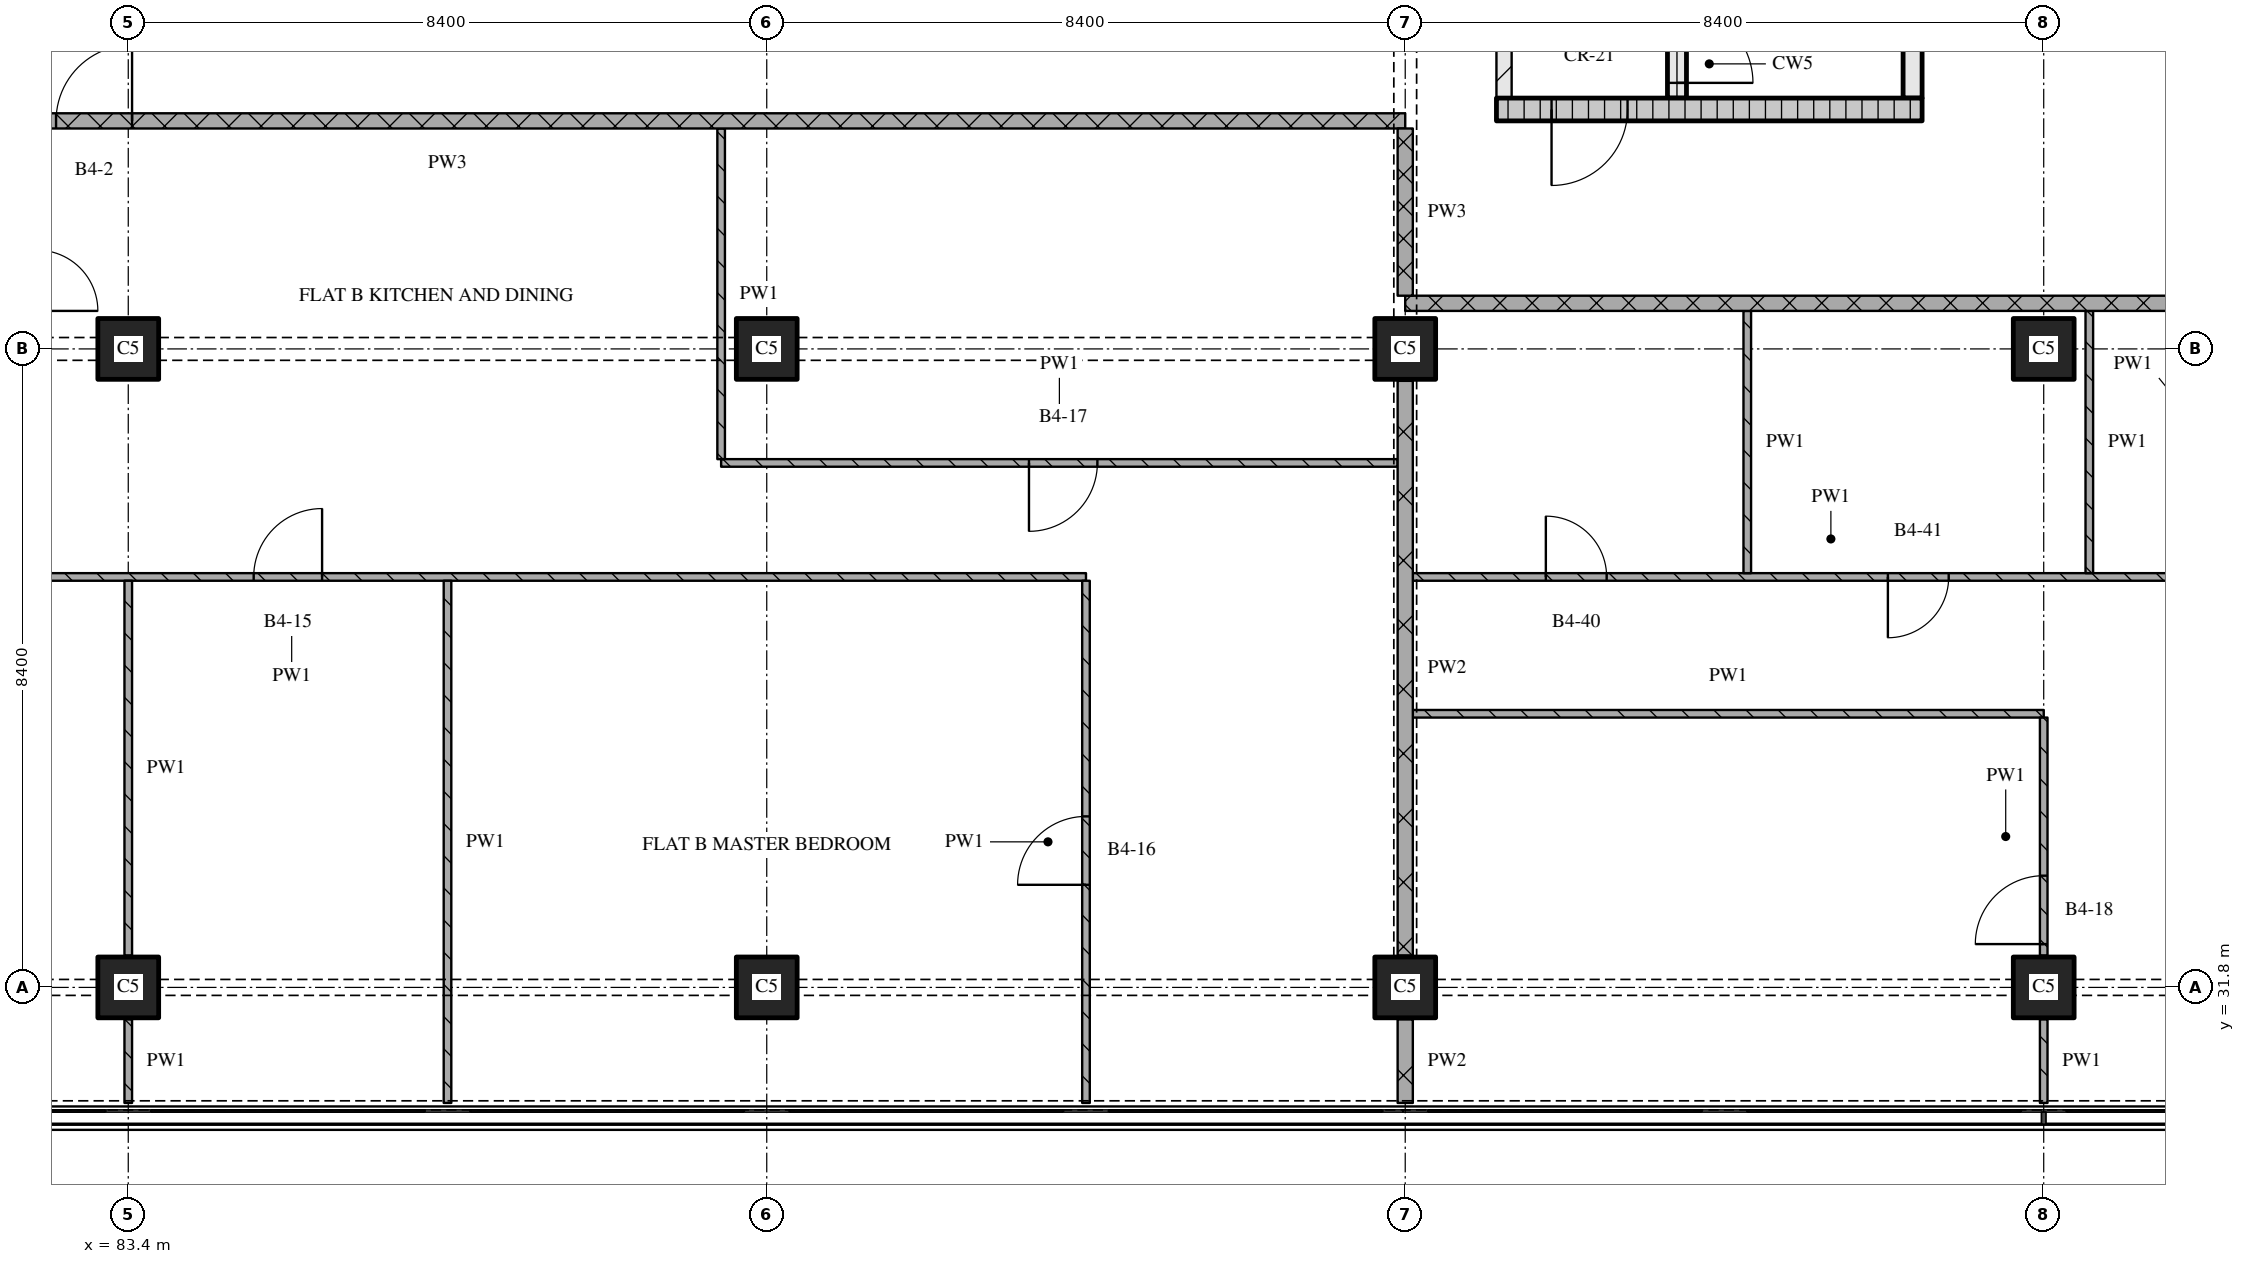
"""IFC4 building model, lengths in metres.
Left out: names, types, materials, properties, quantities, classifications, styles, units other than length and angle.
Written with IfcOpenShell. Run it as: python <this file> out.ifc"""

import sys

from ifc_helpers import new_model, si_unit, direction, frame, frame_2d, origin, origin_2d, place, context, subcontext, project, spatial, rectangle, extrude, element, fill, save


model = new_model("IFC4")
c1 = context("Model", 3, precision=1e-05, world=origin(), true_north=direction((0.0, 1.0)))
c2 = subcontext(c1, "Body", "Model", "MODEL_VIEW")
j1 = project(units=[si_unit("LENGTHUNIT", "METRE"), si_unit("PLANEANGLEUNIT", "RADIAN")], contexts=[c1])
p1 = place(None, origin())
s1 = spatial("IfcSite", under=j1, at=p1, CompositionType="ELEMENT")
p2 = place(p1, origin())
s2 = spatial("IfcBuilding", under=s1, at=p2, CompositionType="ELEMENT")
p3 = place(p2, frame((0.0, 0.0, 127.65)))
s3 = spatial("IfcBuildingStorey", under=s2, at=p3, CompositionType="ELEMENT", Elevation=127.65)
for number, where, z_axis, x_axis in (
    (1, (83.4, 31.8, 0.0), (0.0, 0.0, 1.0), (1.0, 0.0, 0.0)),
    (2, (83.4, 40.2, 0.0), (0.0, 0.0, 1.0), (1.0, 0.0, 0.0)),
    (3, (91.8, 31.8, 0.0), (0.0, 0.0, 1.0), (1.0, 0.0, 0.0)),
    (4, (91.8, 40.2, 0.0), (0.0, 0.0, 1.0), (1.0, 0.0, 0.0)),
    (5, (100.2, 31.8, 0.0), (0.0, 0.0, 1.0), (1.0, 0.0, 0.0)),
    (6, (100.2, 40.2, 0.0), (0.0, 0.0, 1.0), (1.0, 0.0, 0.0)),
    (7, (108.6, 31.8, 0.0), (0.0, 0.0, 1.0), (1.0, 0.0, 0.0)),
    (8, (108.6, 40.2, 0.0), (0.0, 0.0, 1.0), (1.0, 0.0, 0.0)),
):
    element("IfcColumn", number, at=place(p3, frame(where, z_axis=z_axis, x_axis=x_axis)), inside=s3, PredefinedType="COLUMN", context=c2, shape_type="SweptSolid", body=[
        extrude(rectangle(XDim=0.8, YDim=0.8, at=origin_2d()), origin(), (0.0, 0.0, 1.0), 3.6),
    ])
p4 = place(p3, frame((101.4, 43.35, 0.0), z_axis=(0.0, 0.0, 1.0), x_axis=(1.0, 0.0, 0.0)))
e9 = element("IfcWall", 9, at=p4, inside=s3, PredefinedType="SOLIDWALL", context=c2, shape_type="SweptSolid", body=[
    extrude(rectangle(XDim=5.6, YDim=0.3, at=frame_2d((2.8, 0.0))), origin(), (0.0, 0.0, 1.0), 3.32),
])
p5 = place(p4, frame((0.725, 0.0, 0.0)))
e10 = element("IfcOpeningElement", 10, at=p5, cuts=e9, PredefinedType="OPENING", context=c2, shape_type="SweptSolid", body=[
    extrude(rectangle(XDim=1.0, YDim=2.1, at=frame_2d((0.5, 1.05))), frame((0.0, 0.16, 0.0), z_axis=(0.0, -1.0, 0.0), x_axis=(1.0, 0.0, 0.0)), (0.0, 0.0, 1.0), 0.32),
])
p6 = place(p3, frame((101.5, 43.5, 0.0), z_axis=(0.0, 0.0, 1.0), x_axis=(0.0, 1.0, 0.0)))
e11 = element("IfcWall", 11, at=p6, inside=s3, PredefinedType="PARTITIONING", context=c2, shape_type="SweptSolid", body=[
    extrude(rectangle(XDim=6.9, YDim=0.2, at=frame_2d((3.45, 0.0))), origin(), (0.0, 0.0, 1.0), 3.32),
])
p7 = place(p6, frame((1.0, 0.0, 0.0)))
e12 = element("IfcOpeningElement", 12, at=p7, cuts=e11, PredefinedType="OPENING", context=c2, shape_type="SweptSolid", body=[
    extrude(rectangle(XDim=1.0, YDim=2.1, at=frame_2d((0.5, 1.05))), frame((0.0, 0.11, 0.0), z_axis=(0.0, -1.0, 0.0), x_axis=(1.0, 0.0, 0.0)), (0.0, 0.0, 1.0), 0.22),
])
p8 = place(p3, frame((103.775, 43.5, 0.0), z_axis=(0.0, 0.0, 1.0), x_axis=(0.0, 1.0, 0.0)))
e13 = element("IfcWall", 13, at=p8, inside=s3, PredefinedType="SOLIDWALL", context=c2, shape_type="SweptSolid", body=[
    extrude(rectangle(XDim=6.9, YDim=0.25, at=frame_2d((3.45, 0.0))), origin(), (0.0, 0.0, 1.0), 3.32),
])
p9 = place(p8, frame((0.2, 0.0, 0.0)))
e14 = element("IfcOpeningElement", 14, at=p9, cuts=e13, PredefinedType="OPENING", context=c2, shape_type="SweptSolid", body=[
    extrude(rectangle(XDim=1.0, YDim=2.1, at=frame_2d((0.5, 1.05))), frame((0.0, 0.135, 0.0), z_axis=(0.0, -1.0, 0.0), x_axis=(1.0, 0.0, 0.0)), (0.0, 0.0, 1.0), 0.27),
])
p10 = place(p3, frame((106.875, 43.5, 0.0), z_axis=(0.0, 0.0, 1.0), x_axis=(0.0, 1.0, 0.0)))
e15 = element("IfcWall", 15, at=p10, inside=s3, PredefinedType="SOLIDWALL", context=c2, shape_type="SweptSolid", body=[
    extrude(rectangle(XDim=6.9, YDim=0.25, at=frame_2d((3.45, 0.0))), origin(), (0.0, 0.0, 1.0), 3.32),
])
p11 = place(p3, frame((100.3, 35.4, 0.0), z_axis=(0.0, 0.0, 1.0), x_axis=(1.0, 0.0, 0.0)))
e16 = element("IfcWall", 16, at=p11, inside=s3, PredefinedType="PARTITIONING", context=c2, shape_type="SweptSolid", body=[
    extrude(rectangle(XDim=8.3, YDim=0.1, at=frame_2d((4.15, 0.0))), origin(), (0.0, 0.0, 1.0), 3.32),
])
p12 = place(p3, frame((96.0, 37.2, 0.0), z_axis=(0.0, 0.0, 1.0), x_axis=(-1.0, 0.0, 0.0)))
e17 = element("IfcWall", 17, at=p12, inside=s3, PredefinedType="PARTITIONING", context=c2, shape_type="SweptSolid", body=[
    extrude(rectangle(XDim=20.9, YDim=0.1, at=frame_2d((10.45, 0.0))), origin(), (0.0, 0.0, 1.0), 3.32),
])
p13 = place(p12, frame((10.05, 0.0, 0.0)))
e18 = element("IfcOpeningElement", 18, at=p13, cuts=e17, PredefinedType="OPENING", context=c2, shape_type="SweptSolid", body=[
    extrude(rectangle(XDim=0.9, YDim=2.1, at=frame_2d((0.45, 1.05))), frame((0.0, 0.06, 0.0), z_axis=(0.0, -1.0, 0.0), x_axis=(1.0, 0.0, 0.0)), (0.0, 0.0, 1.0), 0.12),
])
p14 = place(p12, frame((14.25, 0.0, 0.0)))
e19 = element("IfcOpeningElement", 19, at=p14, cuts=e17, PredefinedType="OPENING", context=c2, shape_type="SweptSolid", body=[
    extrude(rectangle(XDim=0.9, YDim=2.1, at=frame_2d((0.45, 1.05))), frame((0.0, 0.06, 0.0), z_axis=(0.0, -1.0, 0.0), x_axis=(1.0, 0.0, 0.0)), (0.0, 0.0, 1.0), 0.12),
])
p15 = place(p12, frame((18.45, 0.0, 0.0)))
e20 = element("IfcOpeningElement", 20, at=p15, cuts=e17, PredefinedType="OPENING", context=c2, shape_type="SweptSolid", body=[
    extrude(rectangle(XDim=0.9, YDim=2.1, at=frame_2d((0.45, 1.05))), frame((0.0, 0.06, 0.0), z_axis=(0.0, -1.0, 0.0), x_axis=(1.0, 0.0, 0.0)), (0.0, 0.0, 1.0), 0.12),
])
p16 = place(p3, frame((100.3, 37.2, 0.0), z_axis=(0.0, 0.0, 1.0), x_axis=(1.0, 0.0, 0.0)))
e21 = element("IfcWall", 21, at=p16, inside=s3, PredefinedType="PARTITIONING", context=c2, shape_type="SweptSolid", body=[
    extrude(rectangle(XDim=11.0, YDim=0.1, at=frame_2d((5.5, 0.0))), origin(), (0.0, 0.0, 1.0), 3.32),
])
p17 = place(p16, frame((1.75, 0.0, 0.0)))
e22 = element("IfcOpeningElement", 22, at=p17, cuts=e21, PredefinedType="OPENING", context=c2, shape_type="SweptSolid", body=[
    extrude(rectangle(XDim=0.8, YDim=2.1, at=frame_2d((0.4, 1.05))), frame((0.0, 0.06, 0.0), z_axis=(0.0, -1.0, 0.0), x_axis=(1.0, 0.0, 0.0)), (0.0, 0.0, 1.0), 0.12),
])
p18 = place(p16, frame((6.25, 0.0, 0.0)))
e23 = element("IfcOpeningElement", 23, at=p18, cuts=e21, PredefinedType="OPENING", context=c2, shape_type="SweptSolid", body=[
    extrude(rectangle(XDim=0.8, YDim=2.1, at=frame_2d((0.4, 1.05))), frame((0.0, 0.06, 0.0), z_axis=(0.0, -1.0, 0.0), x_axis=(1.0, 0.0, 0.0)), (0.0, 0.0, 1.0), 0.12),
])
p19 = place(p3, frame((91.2, 38.7, 0.0), z_axis=(0.0, 0.0, 1.0), x_axis=(1.0, 0.0, 0.0)))
e24 = element("IfcWall", 24, at=p19, inside=s3, PredefinedType="PARTITIONING", context=c2, shape_type="SweptSolid", body=[
    extrude(rectangle(XDim=8.9, YDim=0.1, at=frame_2d((4.45, 0.0))), origin(), (0.0, 0.0, 1.0), 3.32),
])
p20 = place(p19, frame((4.05, 0.0, 0.0)))
e25 = element("IfcOpeningElement", 25, at=p20, cuts=e24, PredefinedType="OPENING", context=c2, shape_type="SweptSolid", body=[
    extrude(rectangle(XDim=0.9, YDim=2.1, at=frame_2d((0.45, 1.05))), frame((0.0, 0.06, 0.0), z_axis=(0.0, -1.0, 0.0), x_axis=(1.0, 0.0, 0.0)), (0.0, 0.0, 1.0), 0.12),
])
p21 = place(p3, frame((124.38, 40.8, 0.0), z_axis=(0.0, 0.0, 1.0), x_axis=(-1.0, 0.0, 0.0)))
e26 = element("IfcWall", 26, at=p21, inside=s3, PredefinedType="PARTITIONING", context=c2, shape_type="SweptSolid", body=[
    extrude(rectangle(XDim=24.18, YDim=0.2, at=frame_2d((12.09, 0.0))), origin(), (0.0, 0.0, 1.0), 3.32),
])
p22 = place(p21, frame((11.83, 0.0, 0.0)))
e27 = element("IfcOpeningElement", 27, at=p22, cuts=e26, PredefinedType="OPENING", context=c2, shape_type="SweptSolid", body=[
    extrude(rectangle(XDim=1.0, YDim=2.1, at=frame_2d((0.5, 1.05))), frame((0.0, 0.11, 0.0), z_axis=(0.0, -1.0, 0.0), x_axis=(1.0, 0.0, 0.0)), (0.0, 0.0, 1.0), 0.22),
])
p23 = place(p3, frame((100.2, 43.2, 0.0), z_axis=(0.0, 0.0, 1.0), x_axis=(-1.0, 0.0, 0.0)))
e28 = element("IfcWall", 28, at=p23, inside=s3, PredefinedType="PARTITIONING", context=c2, shape_type="SweptSolid", body=[
    extrude(rectangle(XDim=25.2, YDim=0.2, at=frame_2d((12.6, 0.0))), origin(), (0.0, 0.0, 1.0), 3.32),
])
p24 = place(p23, frame((16.75, 0.0, 0.0)))
e29 = element("IfcOpeningElement", 29, at=p24, cuts=e28, PredefinedType="OPENING", context=c2, shape_type="SweptSolid", body=[
    extrude(rectangle(XDim=1.0, YDim=2.1, at=frame_2d((0.5, 1.05))), frame((0.0, 0.11, 0.0), z_axis=(0.0, -1.0, 0.0), x_axis=(1.0, 0.0, 0.0)), (0.0, 0.0, 1.0), 0.22),
])
p25 = place(p3, frame((83.4, 31.38, 0.0), z_axis=(0.0, 0.0, 1.0), x_axis=(0.0, -1.0, 0.0)))
e30 = element("IfcWall", 30, at=p25, inside=s3, PredefinedType="PARTITIONING", context=c2, shape_type="SweptSolid", body=[
    extrude(rectangle(XDim=1.1, YDim=0.1, at=frame_2d((0.55, 0.0))), origin(), (0.0, 0.0, 1.0), 3.32),
])
p26 = place(p3, frame((83.4, 37.15, 0.0), z_axis=(0.0, 0.0, 1.0), x_axis=(0.0, -1.0, 0.0)))
e31 = element("IfcWall", 31, at=p26, inside=s3, PredefinedType="PARTITIONING", context=c2, shape_type="SweptSolid", body=[
    extrude(rectangle(XDim=4.93, YDim=0.1, at=frame_2d((2.465, 0.0))), origin(), (0.0, 0.0, 1.0), 3.32),
])
p27 = place(p3, frame((87.6, 37.15, 0.0), z_axis=(0.0, 0.0, 1.0), x_axis=(0.0, -1.0, 0.0)))
e32 = element("IfcWall", 32, at=p27, inside=s3, PredefinedType="PARTITIONING", context=c2, shape_type="SweptSolid", body=[
    extrude(rectangle(XDim=6.87, YDim=0.1, at=frame_2d((3.435, 0.0))), origin(), (0.0, 0.0, 1.0), 3.32),
])
p28 = place(p3, frame((91.2, 43.1, 0.0), z_axis=(0.0, 0.0, 1.0), x_axis=(0.0, -1.0, 0.0)))
e33 = element("IfcWall", 33, at=p28, inside=s3, PredefinedType="PARTITIONING", context=c2, shape_type="SweptSolid", body=[
    extrude(rectangle(XDim=4.35, YDim=0.1, at=frame_2d((2.175, 0.0))), origin(), (0.0, 0.0, 1.0), 3.32),
])
p29 = place(p3, frame((96.0, 30.28, 0.0), z_axis=(0.0, 0.0, 1.0), x_axis=(0.0, 1.0, 0.0)))
e34 = element("IfcWall", 34, at=p29, inside=s3, PredefinedType="PARTITIONING", context=c2, shape_type="SweptSolid", body=[
    extrude(rectangle(XDim=6.87, YDim=0.1, at=frame_2d((3.435, 0.0))), origin(), (0.0, 0.0, 1.0), 3.32),
])
p30 = place(p29, frame((2.87, 0.0, 0.0)))
e35 = element("IfcOpeningElement", 35, at=p30, cuts=e34, PredefinedType="OPENING", context=c2, shape_type="SweptSolid", body=[
    extrude(rectangle(XDim=0.9, YDim=2.1, at=frame_2d((0.45, 1.05))), frame((0.0, 0.06, 0.0), z_axis=(0.0, -1.0, 0.0), x_axis=(1.0, 0.0, 0.0)), (0.0, 0.0, 1.0), 0.12),
])
p31 = place(p3, frame((100.2, 43.1, 0.0), z_axis=(0.0, 0.0, 1.0), x_axis=(0.0, -1.0, 0.0)))
e36 = element("IfcWall", 36, at=p31, inside=s3, PredefinedType="PARTITIONING", context=c2, shape_type="SweptSolid", body=[
    extrude(rectangle(XDim=2.2, YDim=0.2, at=frame_2d((1.1, 0.0))), origin(), (0.0, 0.0, 1.0), 2.43),
])
p32 = place(p3, frame((100.2, 31.38, 0.0), z_axis=(0.0, 0.0, 1.0), x_axis=(0.0, -1.0, 0.0)))
e37 = element("IfcWall", 37, at=p32, inside=s3, PredefinedType="PARTITIONING", context=c2, shape_type="SweptSolid", body=[
    extrude(rectangle(XDim=1.1, YDim=0.2, at=frame_2d((0.55, 0.0))), origin(), (0.0, 0.0, 1.0), 3.32),
])
p33 = place(p3, frame((100.2, 39.78, 0.0), z_axis=(0.0, 0.0, 1.0), x_axis=(0.0, -1.0, 0.0)))
e38 = element("IfcWall", 38, at=p33, inside=s3, PredefinedType="PARTITIONING", context=c2, shape_type="SweptSolid", body=[
    extrude(rectangle(XDim=7.56, YDim=0.2, at=frame_2d((3.78, 0.0))), origin(), (0.0, 0.0, 1.0), 2.83),
])
p34 = place(p3, frame((104.7, 40.7, 0.0), z_axis=(0.0, 0.0, 1.0), x_axis=(0.0, -1.0, 0.0)))
e39 = element("IfcWall", 39, at=p34, inside=s3, PredefinedType="PARTITIONING", context=c2, shape_type="SweptSolid", body=[
    extrude(rectangle(XDim=3.45, YDim=0.1, at=frame_2d((1.725, 0.0))), origin(), (0.0, 0.0, 1.0), 3.32),
])
p35 = place(p3, frame((108.6, 31.38, 0.0), z_axis=(0.0, 0.0, 1.0), x_axis=(0.0, -1.0, 0.0)))
e40 = element("IfcWall", 40, at=p35, inside=s3, PredefinedType="PARTITIONING", context=c2, shape_type="SweptSolid", body=[
    extrude(rectangle(XDim=1.1, YDim=0.1, at=frame_2d((0.55, 0.0))), origin(), (0.0, 0.0, 1.0), 3.32),
])
p36 = place(p3, frame((108.6, 32.22, 0.0), z_axis=(0.0, 0.0, 1.0), x_axis=(0.0, 1.0, 0.0)))
e41 = element("IfcWall", 41, at=p36, inside=s3, PredefinedType="PARTITIONING", context=c2, shape_type="SweptSolid", body=[
    extrude(rectangle(XDim=3.13, YDim=0.1, at=frame_2d((1.565, 0.0))), origin(), (0.0, 0.0, 1.0), 3.32),
])
p37 = place(p36, frame((0.15, 0.0, 0.0)))
e42 = element("IfcOpeningElement", 42, at=p37, cuts=e41, PredefinedType="OPENING", context=c2, shape_type="SweptSolid", body=[
    extrude(rectangle(XDim=0.9, YDim=2.1, at=frame_2d((0.45, 1.05))), frame((0.0, 0.06, 0.0), z_axis=(0.0, -1.0, 0.0), x_axis=(1.0, 0.0, 0.0)), (0.0, 0.0, 1.0), 0.12),
])
p38 = place(p3, frame((109.2, 40.7, 0.0), z_axis=(0.0, 0.0, 1.0), x_axis=(0.0, -1.0, 0.0)))
e43 = element("IfcWall", 43, at=p38, inside=s3, PredefinedType="PARTITIONING", context=c2, shape_type="SweptSolid", body=[
    extrude(rectangle(XDim=3.45, YDim=0.1, at=frame_2d((1.725, 0.0))), origin(), (0.0, 0.0, 1.0), 3.32),
])
p39 = place(p5, origin())
e44 = element("IfcDoor", 44, at=p39, inside=s3, OperationType="SINGLE_SWING_RIGHT", PredefinedType="DOOR", context=c2, shape_type="SweptSolid", body=[
    extrude(rectangle(XDim=1.0, YDim=2.1, at=frame_2d((0.5, 1.05))), frame((0.0, 0.025, 0.0), z_axis=(0.0, -1.0, 0.0), x_axis=(1.0, 0.0, 0.0)), (0.0, 0.0, 1.0), 0.05),
])
fill(e10, e44)
p40 = place(p9, origin())
e45 = element("IfcDoor", 45, at=p40, inside=s3, OperationType="SINGLE_SWING_RIGHT", PredefinedType="DOOR", context=c2, shape_type="SweptSolid", body=[
    extrude(rectangle(XDim=1.0, YDim=2.1, at=frame_2d((0.5, 1.05))), frame((0.0, 0.025, 0.0), z_axis=(0.0, -1.0, 0.0), x_axis=(1.0, 0.0, 0.0)), (0.0, 0.0, 1.0), 0.05),
])
fill(e14, e45)
p41 = place(p13, origin())
e46 = element("IfcDoor", 46, at=p41, inside=s3, OperationType="SINGLE_SWING_RIGHT", PredefinedType="DOOR", context=c2, shape_type="SweptSolid", body=[
    extrude(rectangle(XDim=0.9, YDim=2.1, at=frame_2d((0.45, 1.05))), frame((0.0, 0.025, 0.0), z_axis=(0.0, -1.0, 0.0), x_axis=(1.0, 0.0, 0.0)), (0.0, 0.0, 1.0), 0.05),
])
fill(e18, e46)
p42 = place(p17, origin())
e47 = element("IfcDoor", 47, at=p42, inside=s3, OperationType="SINGLE_SWING_LEFT", PredefinedType="DOOR", context=c2, shape_type="SweptSolid", body=[
    extrude(rectangle(XDim=0.8, YDim=2.1, at=frame_2d((0.4, 1.05))), frame((0.0, 0.025, 0.0), z_axis=(0.0, -1.0, 0.0), x_axis=(1.0, 0.0, 0.0)), (0.0, 0.0, 1.0), 0.05),
])
fill(e22, e47)
p43 = place(p18, origin())
e48 = element("IfcDoor", 48, at=p43, inside=s3, OperationType="SINGLE_SWING_RIGHT", PredefinedType="DOOR", context=c2, shape_type="SweptSolid", body=[
    extrude(rectangle(XDim=0.8, YDim=2.1, at=frame_2d((0.4, 1.05))), frame((0.0, 0.025, 0.0), z_axis=(0.0, -1.0, 0.0), x_axis=(1.0, 0.0, 0.0)), (0.0, 0.0, 1.0), 0.05),
])
fill(e23, e48)
p44 = place(p20, origin())
e49 = element("IfcDoor", 49, at=p44, inside=s3, OperationType="SINGLE_SWING_RIGHT", PredefinedType="DOOR", context=c2, shape_type="SweptSolid", body=[
    extrude(rectangle(XDim=0.9, YDim=2.1, at=frame_2d((0.45, 1.05))), frame((0.0, 0.025, 0.0), z_axis=(0.0, -1.0, 0.0), x_axis=(1.0, 0.0, 0.0)), (0.0, 0.0, 1.0), 0.05),
])
fill(e25, e49)
p45 = place(p24, origin())
e50 = element("IfcDoor", 50, at=p45, inside=s3, OperationType="SINGLE_SWING_RIGHT", PredefinedType="DOOR", context=c2, shape_type="SweptSolid", body=[
    extrude(rectangle(XDim=1.0, YDim=2.1, at=frame_2d((0.5, 1.05))), frame((0.0, 0.025, 0.0), z_axis=(0.0, -1.0, 0.0), x_axis=(1.0, 0.0, 0.0)), (0.0, 0.0, 1.0), 0.05),
])
fill(e29, e50)
p46 = place(p30, origin())
e51 = element("IfcDoor", 51, at=p46, inside=s3, OperationType="SINGLE_SWING_LEFT", PredefinedType="DOOR", context=c2, shape_type="SweptSolid", body=[
    extrude(rectangle(XDim=0.9, YDim=2.1, at=frame_2d((0.45, 1.05))), frame((0.0, 0.025, 0.0), z_axis=(0.0, -1.0, 0.0), x_axis=(1.0, 0.0, 0.0)), (0.0, 0.0, 1.0), 0.05),
])
fill(e35, e51)
p47 = place(p37, origin())
e52 = element("IfcDoor", 52, at=p47, inside=s3, OperationType="SINGLE_SWING_LEFT", PredefinedType="DOOR", context=c2, shape_type="SweptSolid", body=[
    extrude(rectangle(XDim=0.9, YDim=2.1, at=frame_2d((0.45, 1.05))), frame((0.0, 0.025, 0.0), z_axis=(0.0, -1.0, 0.0), x_axis=(1.0, 0.0, 0.0)), (0.0, 0.0, 1.0), 0.05),
])
fill(e42, e52)
save(model, sys.argv[1])
